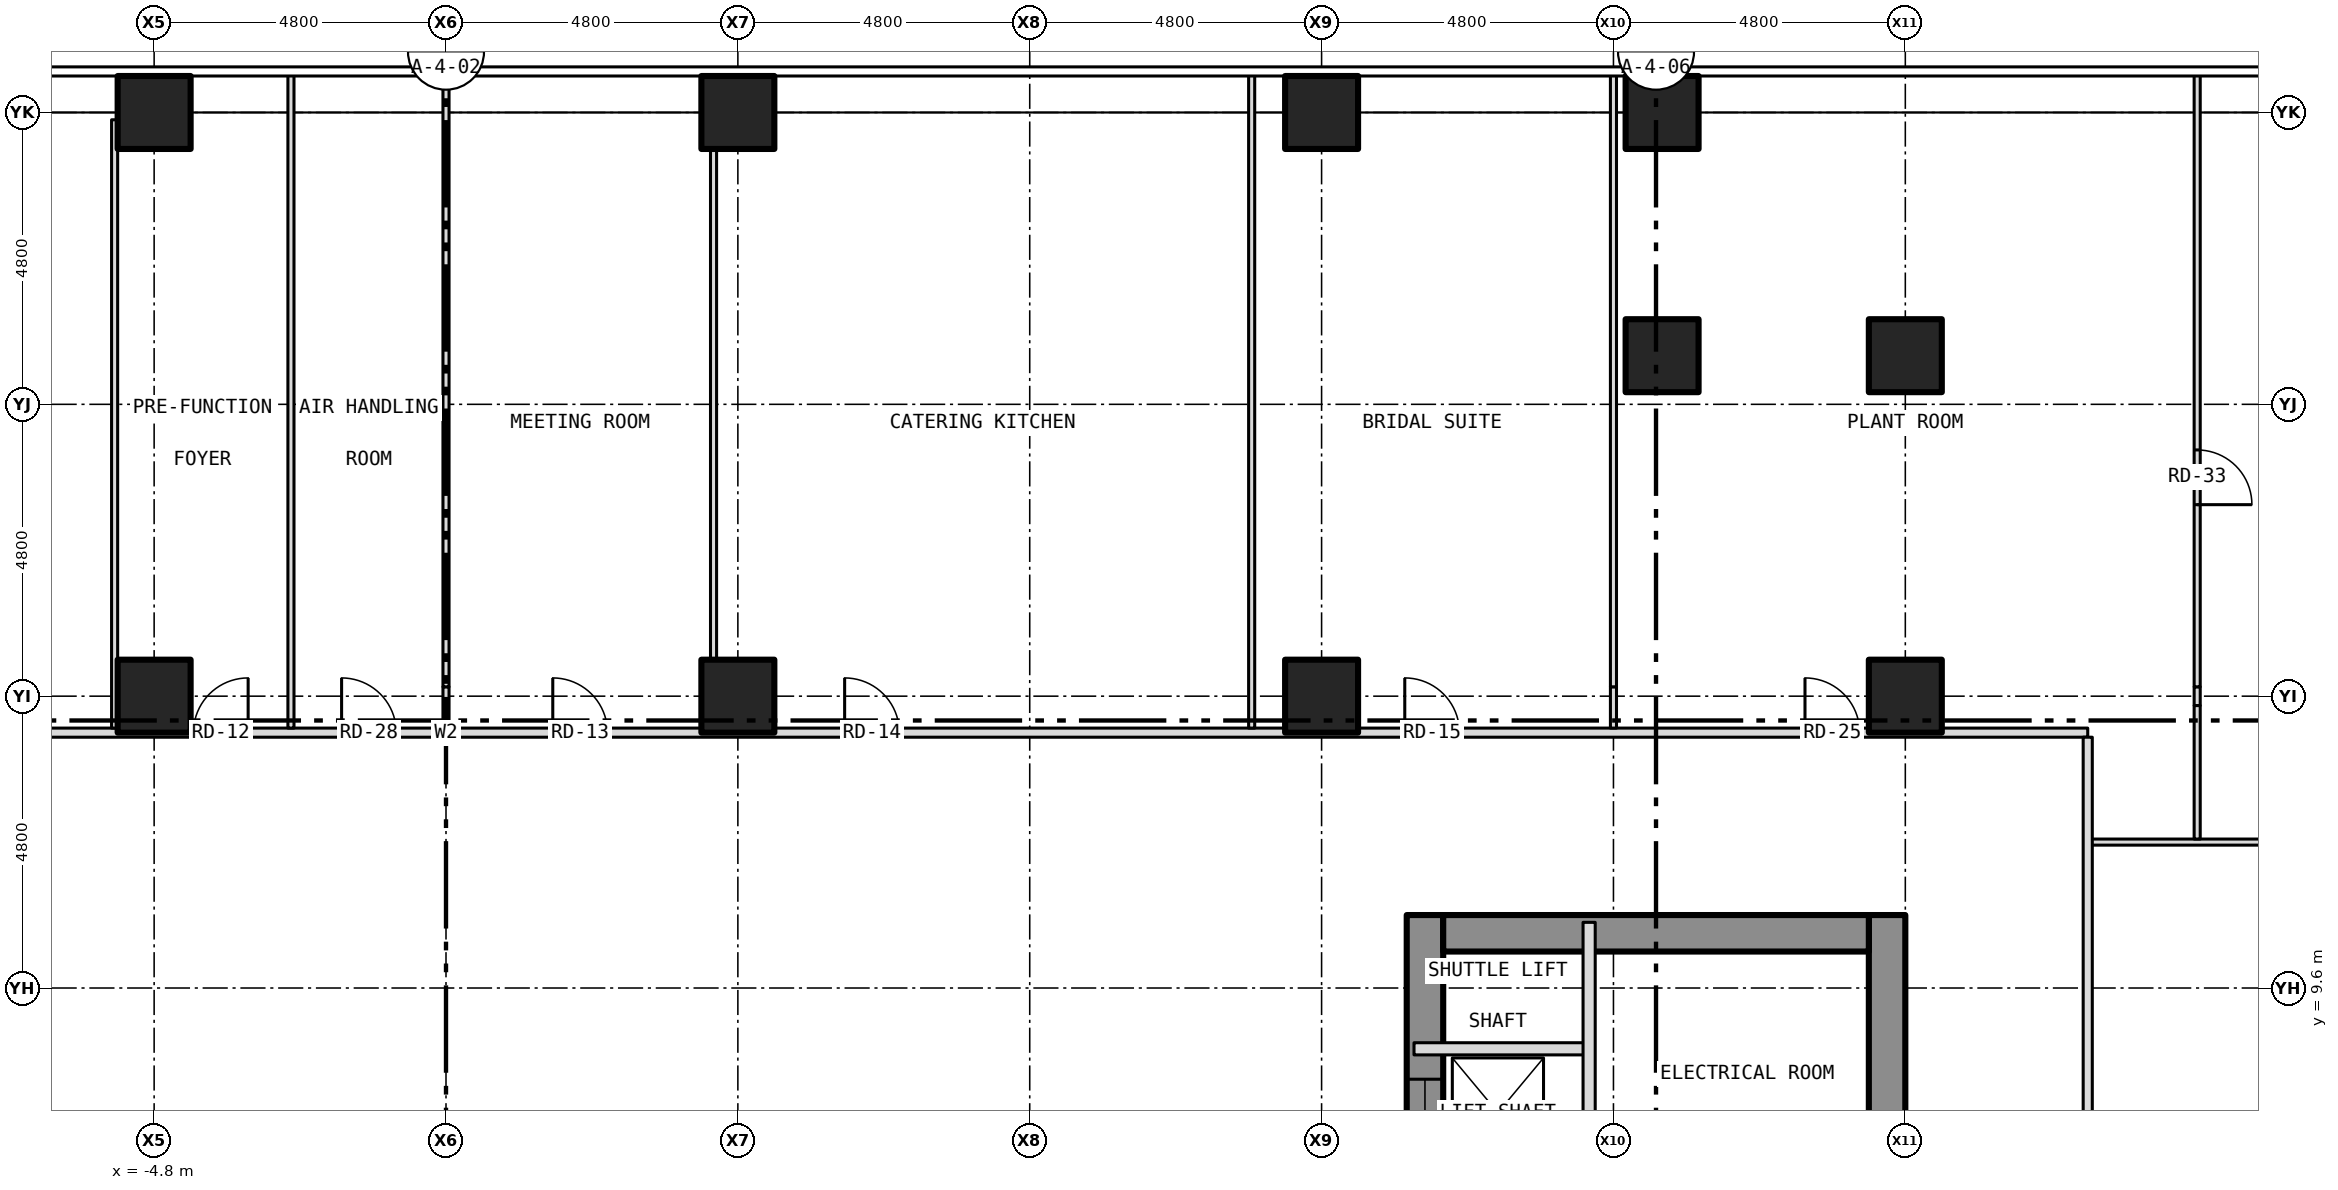
"""IFC4 building model, lengths in metres.
Left out: names, types, materials, properties, quantities, classifications, styles, units other than length and angle.
Written with IfcOpenShell. Run it as: python <this file> out.ifc"""

import sys

from ifc_helpers import new_model, si_unit, direction, frame, frame_2d, origin, origin_2d, place, context, subcontext, project, spatial, rectangle, hollow_rectangle, extrude, element, fill, save


model = new_model("IFC4")
c1 = context("Model", 3, precision=1e-05, world=origin(), true_north=direction((0.0, 1.0)))
c2 = subcontext(c1, "Body", "Model", "MODEL_VIEW")
j1 = project(units=[si_unit("LENGTHUNIT", "METRE"), si_unit("PLANEANGLEUNIT", "RADIAN")], contexts=[c1])
p1 = place(None, origin())
s1 = spatial("IfcSite", under=j1, at=p1, CompositionType="ELEMENT")
p2 = place(p1, origin())
s2 = spatial("IfcBuilding", under=s1, at=p2, CompositionType="ELEMENT")
p3 = place(p2, frame((0.0, 0.0, 7.5)))
s3 = spatial("IfcBuildingStorey", under=s2, at=p3, CompositionType="ELEMENT", Elevation=7.5)
for number, where, z_axis, x_axis in (
    (1, (-4.8, 24.0, -0.25), (0.0, 0.0, 1.0), (1.0, 0.0, 0.0)),
    (2, (4.8, 24.0, -0.25), (0.0, 0.0, 1.0), (1.0, 0.0, 0.0)),
    (3, (14.4, 24.0, -0.25), (0.0, 0.0, 1.0), (1.0, 0.0, 0.0)),
    (4, (20.0, 24.0, -0.25), (0.0, 0.0, 1.0), (1.0, 0.0, 0.0)),
    (5, (-4.8, 14.4, -0.25), (0.0, 0.0, 1.0), (1.0, 0.0, 0.0)),
    (6, (4.8, 14.4, -0.25), (0.0, 0.0, 1.0), (1.0, 0.0, 0.0)),
    (7, (14.4, 14.4, -0.25), (0.0, 0.0, 1.0), (1.0, 0.0, 0.0)),
    (8, (20.0, 20.0, -0.25), (0.0, 0.0, 1.0), (1.0, 0.0, 0.0)),
    (9, (24.0, 14.4, -0.25), (0.0, 0.0, 1.0), (1.0, 0.0, 0.0)),
    (10, (24.0, 20.0, -0.25), (0.0, 0.0, 1.0), (1.0, 0.0, 0.0)),
):
    element("IfcColumn", number, at=place(p3, frame(where, z_axis=z_axis, x_axis=x_axis)), inside=s3, PredefinedType="COLUMN", context=c2, shape_type="SweptSolid", body=[
        extrude(hollow_rectangle(XDim=1.2, YDim=1.2, WallThickness=0.07, at=origin_2d()), origin(), (0.0, 0.0, 1.0), 8.05),
    ])
p4 = place(p3, frame((16.1, -10.8, 0.0), z_axis=(0.0, 0.0, 1.0), x_axis=(0.0, 1.0, 0.0)))
e11 = element("IfcWall", 11, at=p4, inside=s3, PredefinedType="SHEAR", context=c2, shape_type="SweptSolid", body=[
    extrude(rectangle(XDim=21.6, YDim=0.6, at=frame_2d((10.8, 0.0))), origin(), (0.0, 0.0, 1.0), 7.7),
])
p5 = place(p4, frame((9.4, 0.0, 0.0)))
e12 = element("IfcOpeningElement", 12, at=p5, cuts=e11, PredefinedType="OPENING", context=c2, shape_type="SweptSolid", body=[
    extrude(rectangle(XDim=1.1, YDim=2.1, at=frame_2d((0.55, 1.05))), frame((0.0, 0.312, 0.0), z_axis=(0.0, -1.0, 0.0), x_axis=(1.0, 0.0, 0.0)), (0.0, 0.0, 1.0), 0.624),
])
p6 = place(p4, frame((11.5, 0.0, 0.0)))
e13 = element("IfcOpeningElement", 13, at=p6, cuts=e11, PredefinedType="OPENING", context=c2, shape_type="SweptSolid", body=[
    extrude(rectangle(XDim=1.1, YDim=2.1, at=frame_2d((0.55, 1.05))), frame((0.0, 0.312, 0.0), z_axis=(0.0, -1.0, 0.0), x_axis=(1.0, 0.0, 0.0)), (0.0, 0.0, 1.0), 0.624),
])
p7 = place(p4, frame((13.6, 0.0, 0.0)))
e14 = element("IfcOpeningElement", 14, at=p7, cuts=e11, PredefinedType="OPENING", context=c2, shape_type="SweptSolid", body=[
    extrude(rectangle(XDim=1.1, YDim=2.1, at=frame_2d((0.55, 1.05))), frame((0.0, 0.312, 0.0), z_axis=(0.0, -1.0, 0.0), x_axis=(1.0, 0.0, 0.0)), (0.0, 0.0, 1.0), 0.624),
])
p8 = place(p4, frame((15.7, 0.0, 0.0)))
e15 = element("IfcOpeningElement", 15, at=p8, cuts=e11, PredefinedType="OPENING", context=c2, shape_type="SweptSolid", body=[
    extrude(rectangle(XDim=1.1, YDim=2.1, at=frame_2d((0.55, 1.05))), frame((0.0, 0.312, 0.0), z_axis=(0.0, -1.0, 0.0), x_axis=(1.0, 0.0, 0.0)), (0.0, 0.0, 1.0), 0.624),
])
p9 = place(p4, frame((17.8, 0.0, 0.0)))
e16 = element("IfcOpeningElement", 16, at=p9, cuts=e11, PredefinedType="OPENING", context=c2, shape_type="SweptSolid", body=[
    extrude(rectangle(XDim=1.1, YDim=2.1, at=frame_2d((0.55, 1.05))), frame((0.0, 0.312, 0.0), z_axis=(0.0, -1.0, 0.0), x_axis=(1.0, 0.0, 0.0)), (0.0, 0.0, 1.0), 0.624),
])
p10 = place(p4, frame((5.642, 0.0, 0.0)))
e17 = element("IfcOpeningElement", 17, at=p10, cuts=e11, PredefinedType="OPENING", context=c2, shape_type="SweptSolid", body=[
    extrude(rectangle(XDim=1.1, YDim=2.1, at=frame_2d((0.55, 1.05))), frame((0.0, 0.312, 0.0), z_axis=(0.0, -1.0, 0.0), x_axis=(1.0, 0.0, 0.0)), (0.0, 0.0, 1.0), 0.624),
])
p11 = place(p4, frame((7.5, 0.0, 0.0)))
e18 = element("IfcOpeningElement", 18, at=p11, cuts=e11, PredefinedType="OPENING", context=c2, shape_type="SweptSolid", body=[
    extrude(rectangle(XDim=1.1, YDim=2.1, at=frame_2d((0.55, 1.05))), frame((0.0, 0.312, 0.0), z_axis=(0.0, -1.0, 0.0), x_axis=(1.0, 0.0, 0.0)), (0.0, 0.0, 1.0), 0.624),
])
p12 = place(p3, frame((23.7, -10.8, 0.0), z_axis=(0.0, 0.0, 1.0), x_axis=(0.0, 1.0, 0.0)))
e19 = element("IfcWall", 19, at=p12, inside=s3, PredefinedType="SHEAR", context=c2, shape_type="SweptSolid", body=[
    extrude(rectangle(XDim=21.6, YDim=0.6, at=frame_2d((10.8, 0.0))), origin(), (0.0, 0.0, 1.0), 7.7),
])
p13 = place(p3, frame((16.4, 10.5, 0.0), z_axis=(0.0, 0.0, 1.0), x_axis=(1.0, 0.0, 0.0)))
e20 = element("IfcWall", 20, at=p13, inside=s3, PredefinedType="SHEAR", context=c2, shape_type="SweptSolid", body=[
    extrude(rectangle(XDim=7.0, YDim=0.6, at=frame_2d((3.5, 0.0))), origin(), (0.0, 0.0, 1.0), 7.7),
])
p14 = place(p3, frame((15.92, 8.6, 0.0), z_axis=(0.0, 0.0, 1.0), x_axis=(1.0, 0.0, 0.0)))
e21 = element("IfcWall", 21, at=p14, inside=s3, PredefinedType="PARTITIONING", context=c2, shape_type="SweptSolid", body=[
    extrude(rectangle(XDim=2.88, YDim=0.2, at=frame_2d((1.44, 0.0))), origin(), (0.0, 0.0, 1.0), 7.7),
])
p15 = place(p3, frame((27.0, 12.0, 0.0), z_axis=(0.0, 0.0, 1.0), x_axis=(1.0, 0.0, 0.0)))
e22 = element("IfcWall", 22, at=p15, inside=s3, PredefinedType="PARTITIONING", context=c2, shape_type="SweptSolid", body=[
    extrude(rectangle(XDim=11.28, YDim=0.1, at=frame_2d((5.64, 0.0))), origin(), (0.0, 0.0, 1.0), 7.8),
])
p16 = place(p3, frame((-27.0, 13.8, 0.0), z_axis=(0.0, 0.0, 1.0), x_axis=(1.0, 0.0, 0.0)))
e23 = element("IfcWall", 23, at=p16, inside=s3, PredefinedType="PARTITIONING", context=c2, shape_type="SweptSolid", body=[
    extrude(rectangle(XDim=54.0, YDim=0.15, at=frame_2d((27.0, 0.0))), origin(), (0.0, 0.0, 1.0), 7.8),
])
p17 = place(p16, frame((13.35, 0.0, 0.0)))
e24 = element("IfcOpeningElement", 24, at=p17, cuts=e23, PredefinedType="OPENING", context=c2, shape_type="SweptSolid", body=[
    extrude(rectangle(XDim=0.9, YDim=2.1, at=frame_2d((0.45, 1.05))), frame((0.0, 0.087, 0.0), z_axis=(0.0, -1.0, 0.0), x_axis=(1.0, 0.0, 0.0)), (0.0, 0.0, 1.0), 0.174),
])
p18 = place(p16, frame((22.846, 0.0, 0.0)))
e25 = element("IfcOpeningElement", 25, at=p18, cuts=e23, PredefinedType="OPENING", context=c2, shape_type="SweptSolid", body=[
    extrude(rectangle(XDim=0.9, YDim=2.1, at=frame_2d((0.45, 1.05))), frame((0.0, 0.087, 0.0), z_axis=(0.0, -1.0, 0.0), x_axis=(1.0, 0.0, 0.0)), (0.0, 0.0, 1.0), 0.174),
])
p19 = place(p16, frame((28.756, 0.0, 0.0)))
e26 = element("IfcOpeningElement", 26, at=p19, cuts=e23, PredefinedType="OPENING", context=c2, shape_type="SweptSolid", body=[
    extrude(rectangle(XDim=0.9, YDim=2.1, at=frame_2d((0.45, 1.05))), frame((0.0, 0.087, 0.0), z_axis=(0.0, -1.0, 0.0), x_axis=(1.0, 0.0, 0.0)), (0.0, 0.0, 1.0), 0.174),
])
p20 = place(p16, frame((33.556, 0.0, 0.0)))
e27 = element("IfcOpeningElement", 27, at=p20, cuts=e23, PredefinedType="OPENING", context=c2, shape_type="SweptSolid", body=[
    extrude(rectangle(XDim=0.9, YDim=2.1, at=frame_2d((0.45, 1.05))), frame((0.0, 0.087, 0.0), z_axis=(0.0, -1.0, 0.0), x_axis=(1.0, 0.0, 0.0)), (0.0, 0.0, 1.0), 0.174),
])
p21 = place(p16, frame((42.768, 0.0, 0.0)))
e28 = element("IfcOpeningElement", 28, at=p21, cuts=e23, PredefinedType="OPENING", context=c2, shape_type="SweptSolid", body=[
    extrude(rectangle(XDim=0.9, YDim=2.1, at=frame_2d((0.45, 1.05))), frame((0.0, 0.087, 0.0), z_axis=(0.0, -1.0, 0.0), x_axis=(1.0, 0.0, 0.0)), (0.0, 0.0, 1.0), 0.174),
])
p22 = place(p16, frame((3.75, 0.0, 0.0)))
e29 = element("IfcOpeningElement", 29, at=p22, cuts=e23, PredefinedType="OPENING", context=c2, shape_type="SweptSolid", body=[
    extrude(rectangle(XDim=0.9, YDim=2.1, at=frame_2d((0.45, 1.05))), frame((0.0, 0.087, 0.0), z_axis=(0.0, -1.0, 0.0), x_axis=(1.0, 0.0, 0.0)), (0.0, 0.0, 1.0), 0.174),
])
p23 = place(p16, frame((49.35, 0.0, 0.0)))
e30 = element("IfcOpeningElement", 30, at=p23, cuts=e23, PredefinedType="OPENING", context=c2, shape_type="SweptSolid", body=[
    extrude(rectangle(XDim=0.9, YDim=2.1, at=frame_2d((0.45, 1.05))), frame((0.0, 0.087, 0.0), z_axis=(0.0, -1.0, 0.0), x_axis=(1.0, 0.0, 0.0)), (0.0, 0.0, 1.0), 0.174),
])
p24 = place(p16, frame((25.283, 0.0, 0.0)))
e31 = element("IfcOpeningElement", 31, at=p24, cuts=e23, PredefinedType="OPENING", context=c2, shape_type="SweptSolid", body=[
    extrude(rectangle(XDim=0.9, YDim=2.1, at=frame_2d((0.45, 1.05))), frame((0.0, 0.087, 0.0), z_axis=(0.0, -1.0, 0.0), x_axis=(1.0, 0.0, 0.0)), (0.0, 0.0, 1.0), 0.174),
])
p25 = place(p3, frame((-5.45, 13.875, 0.0), z_axis=(0.0, 0.0, 1.0), x_axis=(0.0, 1.0, 0.0)))
e32 = element("IfcWall", 32, at=p25, inside=s3, PredefinedType="PARTITIONING", context=c2, shape_type="SweptSolid", body=[
    extrude(rectangle(XDim=10.005, YDim=0.1, at=frame_2d((5.002, 0.0))), origin(), (0.0, 0.0, 1.0), 7.8),
])
p26 = place(p3, frame((-2.55, 13.875, 0.0), z_axis=(0.0, 0.0, 1.0), x_axis=(0.0, 1.0, 0.0)))
e33 = element("IfcWall", 33, at=p26, inside=s3, PredefinedType="PARTITIONING", context=c2, shape_type="SweptSolid", body=[
    extrude(rectangle(XDim=10.755, YDim=0.1, at=frame_2d((5.377, 0.0))), origin(), (0.0, 0.0, 1.0), 7.8),
])
p27 = place(p3, frame((0.0, 13.875, 0.0), z_axis=(0.0, 0.0, 1.0), x_axis=(0.0, 1.0, 0.0)))
e34 = element("IfcWall", 34, at=p27, inside=s3, PredefinedType="PARTITIONING", context=c2, shape_type="SweptSolid", body=[
    extrude(rectangle(XDim=0.679, YDim=0.1, at=frame_2d((0.339, 0.0))), origin(), (0.0, 0.0, 1.0), 7.8),
])
p28 = place(p3, frame((0.0, 14.554, 0.0), z_axis=(0.0, 0.0, 1.0), x_axis=(0.0, 1.0, 0.0)))
e35 = element("IfcWall", 35, at=p28, inside=s3, PredefinedType="PARTITIONING", context=c2, shape_type="SweptSolid", body=[
    extrude(rectangle(XDim=10.076, YDim=0.1, at=frame_2d((5.038, 0.0))), origin(), (0.0, 0.0, 1.0), 7.183),
])
p29 = place(p3, frame((4.4, 13.875, 0.0), z_axis=(0.0, 0.0, 1.0), x_axis=(0.0, 1.0, 0.0)))
e36 = element("IfcWall", 36, at=p29, inside=s3, PredefinedType="PARTITIONING", context=c2, shape_type="SweptSolid", body=[
    extrude(rectangle(XDim=10.005, YDim=0.1, at=frame_2d((5.002, 0.0))), origin(), (0.0, 0.0, 1.0), 7.8),
])
p30 = place(p3, frame((13.25, 13.875, 0.0), z_axis=(0.0, 0.0, 1.0), x_axis=(0.0, 1.0, 0.0)))
e37 = element("IfcWall", 37, at=p30, inside=s3, PredefinedType="PARTITIONING", context=c2, shape_type="SweptSolid", body=[
    extrude(rectangle(XDim=10.755, YDim=0.1, at=frame_2d((5.377, 0.0))), origin(), (0.0, 0.0, 1.0), 7.8),
])
p31 = place(p3, frame((18.8, -1.8, 0.0), z_axis=(0.0, 0.0, 1.0), x_axis=(0.0, 1.0, 0.0)))
e38 = element("IfcWall", 38, at=p31, inside=s3, PredefinedType="PARTITIONING", context=c2, shape_type="SweptSolid", body=[
    extrude(rectangle(XDim=12.48, YDim=0.2, at=frame_2d((6.24, 0.0))), origin(), (0.0, 0.0, 1.0), 7.7),
])
p32 = place(p3, frame((19.2, 13.875, 0.0), z_axis=(0.0, 0.0, 1.0), x_axis=(0.0, 1.0, 0.0)))
e39 = element("IfcWall", 39, at=p32, inside=s3, PredefinedType="PARTITIONING", context=c2, shape_type="SweptSolid", body=[
    extrude(rectangle(XDim=0.679, YDim=0.1, at=frame_2d((0.339, 0.0))), origin(), (0.0, 0.0, 1.0), 7.8),
])
p33 = place(p3, frame((19.2, 14.554, 0.0), z_axis=(0.0, 0.0, 1.0), x_axis=(0.0, 1.0, 0.0)))
e40 = element("IfcWall", 40, at=p33, inside=s3, PredefinedType="PARTITIONING", context=c2, shape_type="SweptSolid", body=[
    extrude(rectangle(XDim=10.076, YDim=0.1, at=frame_2d((5.038, 0.0))), origin(), (0.0, 0.0, 1.0), 7.183),
])
p34 = place(p3, frame((27.0, -13.725, 0.0), z_axis=(0.0, 0.0, 1.0), x_axis=(0.0, 1.0, 0.0)))
e41 = element("IfcWall", 41, at=p34, inside=s3, PredefinedType="PARTITIONING", context=c2, shape_type="SweptSolid", body=[
    extrude(rectangle(XDim=27.45, YDim=0.15, at=frame_2d((13.725, 0.0))), origin(), (0.0, 0.0, 1.0), 7.8),
])
p35 = place(p34, frame((7.275, 0.0, 0.0)))
e42 = element("IfcOpeningElement", 42, at=p35, cuts=e41, PredefinedType="OPENING", context=c2, shape_type="SweptSolid", body=[
    extrude(rectangle(XDim=0.9, YDim=2.1, at=frame_2d((0.45, 1.05))), frame((0.0, 0.087, 0.0), z_axis=(0.0, -1.0, 0.0), x_axis=(1.0, 0.0, 0.0)), (0.0, 0.0, 1.0), 0.174),
])
p36 = place(p34, frame((19.275, 0.0, 0.0)))
e43 = element("IfcOpeningElement", 43, at=p36, cuts=e41, PredefinedType="OPENING", context=c2, shape_type="SweptSolid", body=[
    extrude(rectangle(XDim=0.9, YDim=2.1, at=frame_2d((0.45, 1.05))), frame((0.0, 0.087, 0.0), z_axis=(0.0, -1.0, 0.0), x_axis=(1.0, 0.0, 0.0)), (0.0, 0.0, 1.0), 0.174),
])
p37 = place(p3, frame((28.8, 12.05, 0.0), z_axis=(0.0, 0.0, 1.0), x_axis=(0.0, 1.0, 0.0)))
e44 = element("IfcWall", 44, at=p37, inside=s3, PredefinedType="PARTITIONING", context=c2, shape_type="SweptSolid", body=[
    extrude(rectangle(XDim=2.196, YDim=0.1, at=frame_2d((1.098, 0.0))), origin(), (0.0, 0.0, 1.0), 7.183),
])
p38 = place(p3, frame((28.8, 14.246, 0.0), z_axis=(0.0, 0.0, 1.0), x_axis=(0.0, 1.0, 0.0)))
e45 = element("IfcWall", 45, at=p38, inside=s3, PredefinedType="PARTITIONING", context=c2, shape_type="SweptSolid", body=[
    extrude(rectangle(XDim=0.308, YDim=0.1, at=frame_2d((0.154, 0.0))), origin(), (0.0, 0.0, 1.0), 7.8),
])
p39 = place(p3, frame((28.8, 14.554, 0.0), z_axis=(0.0, 0.0, 1.0), x_axis=(0.0, 1.0, 0.0)))
e46 = element("IfcWall", 46, at=p39, inside=s3, PredefinedType="PARTITIONING", context=c2, shape_type="SweptSolid", body=[
    extrude(rectangle(XDim=10.076, YDim=0.1, at=frame_2d((5.038, 0.0))), origin(), (0.0, 0.0, 1.0), 7.183),
])
p40 = place(p39, frame((2.996, 0.0, 0.0)))
e47 = element("IfcOpeningElement", 47, at=p40, cuts=e46, PredefinedType="OPENING", context=c2, shape_type="SweptSolid", body=[
    extrude(rectangle(XDim=0.9, YDim=2.1, at=frame_2d((0.45, 1.05))), frame((0.0, 0.062, 0.0), z_axis=(0.0, -1.0, 0.0), x_axis=(1.0, 0.0, 0.0)), (0.0, 0.0, 1.0), 0.124),
])
p41 = place(p9, origin())
e48 = element("IfcDoor", 48, at=p41, inside=s3, OperationType="SLIDING_TO_LEFT", PredefinedType="DOOR", context=c2, shape_type="SweptSolid", body=[
    extrude(rectangle(XDim=1.1, YDim=2.1, at=frame_2d((0.55, 1.05))), frame((0.0, 0.025, 0.0), z_axis=(0.0, -1.0, 0.0), x_axis=(1.0, 0.0, 0.0)), (0.0, 0.0, 1.0), 0.05),
])
fill(e16, e48)
p42 = place(p18, origin())
e49 = element("IfcDoor", 49, at=p42, inside=s3, OperationType="SINGLE_SWING_RIGHT", PredefinedType="DOOR", context=c2, shape_type="SweptSolid", body=[
    extrude(rectangle(XDim=0.9, YDim=2.1, at=frame_2d((0.45, 1.05))), frame((0.0, 0.025, 0.0), z_axis=(0.0, -1.0, 0.0), x_axis=(1.0, 0.0, 0.0)), (0.0, 0.0, 1.0), 0.05),
])
fill(e25, e49)
p43 = place(p19, origin())
e50 = element("IfcDoor", 50, at=p43, inside=s3, OperationType="SINGLE_SWING_LEFT", PredefinedType="DOOR", context=c2, shape_type="SweptSolid", body=[
    extrude(rectangle(XDim=0.9, YDim=2.1, at=frame_2d((0.45, 1.05))), frame((0.0, 0.025, 0.0), z_axis=(0.0, -1.0, 0.0), x_axis=(1.0, 0.0, 0.0)), (0.0, 0.0, 1.0), 0.05),
])
fill(e26, e50)
p44 = place(p20, origin())
e51 = element("IfcDoor", 51, at=p44, inside=s3, OperationType="SINGLE_SWING_LEFT", PredefinedType="DOOR", context=c2, shape_type="SweptSolid", body=[
    extrude(rectangle(XDim=0.9, YDim=2.1, at=frame_2d((0.45, 1.05))), frame((0.0, 0.025, 0.0), z_axis=(0.0, -1.0, 0.0), x_axis=(1.0, 0.0, 0.0)), (0.0, 0.0, 1.0), 0.05),
])
fill(e27, e51)
p45 = place(p21, origin())
e52 = element("IfcDoor", 52, at=p45, inside=s3, OperationType="SINGLE_SWING_LEFT", PredefinedType="DOOR", context=c2, shape_type="SweptSolid", body=[
    extrude(rectangle(XDim=0.9, YDim=2.1, at=frame_2d((0.45, 1.05))), frame((0.0, 0.025, 0.0), z_axis=(0.0, -1.0, 0.0), x_axis=(1.0, 0.0, 0.0)), (0.0, 0.0, 1.0), 0.05),
])
fill(e28, e52)
p46 = place(p23, origin())
e53 = element("IfcDoor", 53, at=p46, inside=s3, OperationType="SINGLE_SWING_LEFT", PredefinedType="DOOR", context=c2, shape_type="SweptSolid", body=[
    extrude(rectangle(XDim=0.9, YDim=2.1, at=frame_2d((0.45, 1.05))), frame((0.0, 0.025, 0.0), z_axis=(0.0, -1.0, 0.0), x_axis=(1.0, 0.0, 0.0)), (0.0, 0.0, 1.0), 0.05),
])
fill(e30, e53)
p47 = place(p24, origin())
e54 = element("IfcDoor", 54, at=p47, inside=s3, OperationType="SINGLE_SWING_LEFT", PredefinedType="DOOR", context=c2, shape_type="SweptSolid", body=[
    extrude(rectangle(XDim=0.9, YDim=2.1, at=frame_2d((0.45, 1.05))), frame((0.0, 0.025, 0.0), z_axis=(0.0, -1.0, 0.0), x_axis=(1.0, 0.0, 0.0)), (0.0, 0.0, 1.0), 0.05),
])
fill(e31, e54)
p48 = place(p40, origin())
e55 = element("IfcDoor", 55, at=p48, inside=s3, OperationType="SINGLE_SWING_LEFT", PredefinedType="DOOR", context=c2, shape_type="SweptSolid", body=[
    extrude(rectangle(XDim=0.9, YDim=2.1, at=frame_2d((0.45, 1.05))), frame((0.0, 0.025, 0.0), z_axis=(0.0, -1.0, 0.0), x_axis=(1.0, 0.0, 0.0)), (0.0, 0.0, 1.0), 0.05),
])
fill(e47, e55)
save(model, sys.argv[1])
